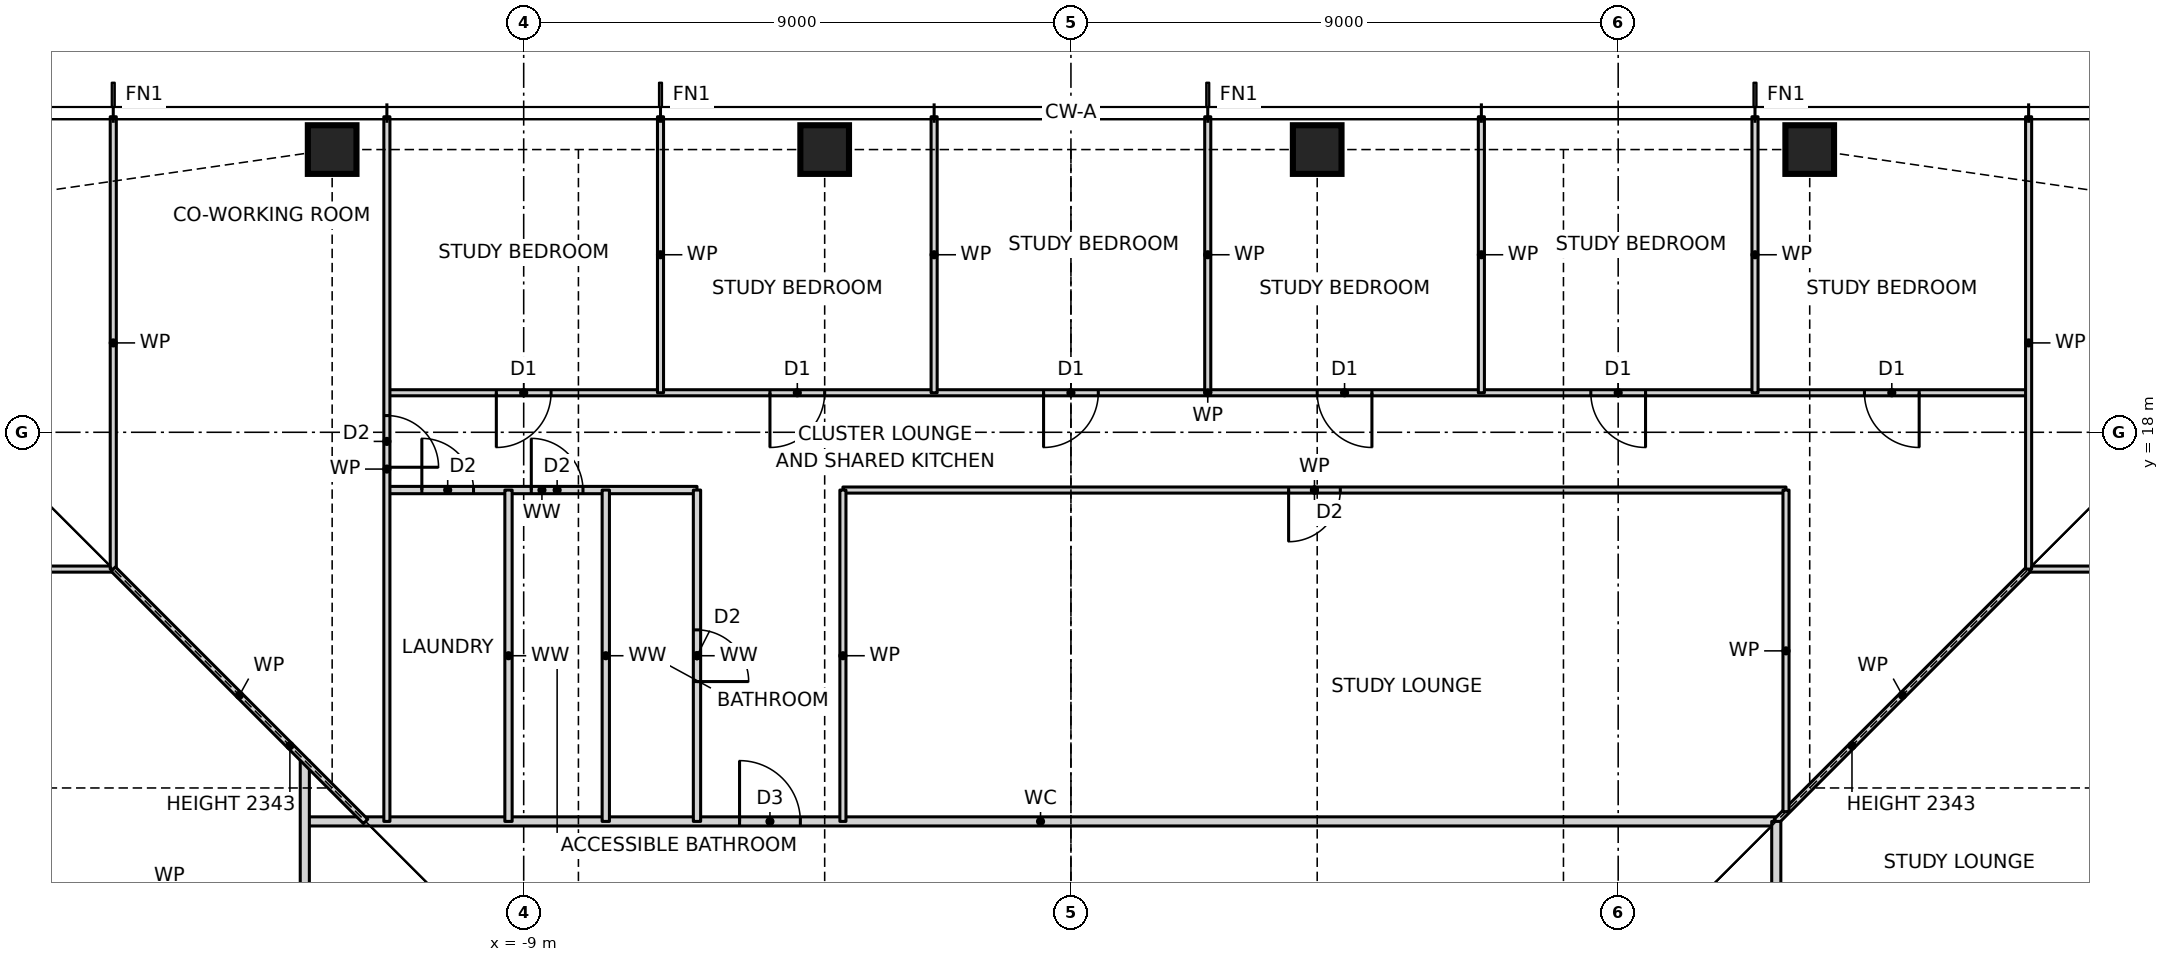
"""IFC4 building model, lengths in metres.
Left out: names, types, materials, properties, quantities, classifications, styles, units other than length and angle.
Written with IfcOpenShell. Run it as: python <this file> out.ifc"""

import sys

from ifc_helpers import new_model, si_unit, direction, frame, frame_2d, origin, origin_2d, place, context, subcontext, project, spatial, rectangle, hollow_rectangle, extrude, element, fill, save


model = new_model("IFC4")
c1 = context("Model", 3, precision=1e-05, world=origin(), true_north=direction((0.0, 1.0)))
c2 = subcontext(c1, "Body", "Model", "MODEL_VIEW")
j1 = project(units=[si_unit("LENGTHUNIT", "METRE"), si_unit("PLANEANGLEUNIT", "RADIAN")], contexts=[c1])
p1 = place(None, origin())
s1 = spatial("IfcSite", under=j1, at=p1, CompositionType="ELEMENT")
p2 = place(p1, origin())
s2 = spatial("IfcBuilding", under=s1, at=p2, CompositionType="ELEMENT")
p3 = place(p2, frame((0.0, 0.0, 50.0)))
s3 = spatial("IfcBuildingStorey", under=s2, at=p3, CompositionType="ELEMENT", Elevation=50.0)
for number, where, z_axis, x_axis in (
    (1, (12.15, 22.65, 0.0), (0.0, 0.0, 1.0), (1.0, 0.0, 0.0)),
    (2, (4.05, 22.65, 0.0), (0.0, 0.0, 1.0), (1.0, 0.0, 0.0)),
    (3, (-4.05, 22.65, 0.0), (0.0, 0.0, 1.0), (1.0, 0.0, 0.0)),
    (4, (-12.15, 22.65, 0.0), (0.0, 0.0, 1.0), (1.0, 0.0, 0.0)),
):
    element("IfcColumn", number, at=place(p3, frame(where, z_axis=z_axis, x_axis=x_axis)), inside=s3, PredefinedType="COLUMN", context=c2, shape_type="SweptSolid", body=[
        extrude(hollow_rectangle(XDim=0.8, YDim=0.8, WallThickness=0.09, at=origin_2d()), origin(), (0.0, 0.0, 1.0), 3.5),
    ])
p4 = place(p3, frame((-12.6, 11.6, 0.0), z_axis=(0.0, 0.0, 1.0), x_axis=(1.0, 0.0, 0.0)))
e5 = element("IfcWall", 5, at=p4, inside=s3, PredefinedType="PARTITIONING", context=c2, shape_type="SweptSolid", body=[
    extrude(rectangle(XDim=24.2, YDim=0.15, at=frame_2d((12.1, 0.0))), origin(), (0.0, 0.0, 1.0), 3.27),
])
p5 = place(p4, frame((7.15, 0.0, 0.0)))
e6 = element("IfcOpeningElement", 6, at=p5, cuts=e5, PredefinedType="OPENING", context=c2, shape_type="SweptSolid", body=[
    extrude(rectangle(XDim=1.0, YDim=2.1, at=frame_2d((0.5, 1.05))), frame((0.0, 0.085, 0.0), z_axis=(0.0, -1.0, 0.0), x_axis=(1.0, 0.0, 0.0)), (0.0, 0.0, 1.0), 0.17),
])
p6 = place(p3, frame((-23.19, 15.75, 0.0), z_axis=(0.0, 0.0, 1.0), x_axis=(1.0, 0.0, 0.0)))
e7 = element("IfcWall", 7, at=p6, inside=s3, PredefinedType="PARTITIONING", context=c2, shape_type="SweptSolid", body=[
    extrude(rectangle(XDim=7.44, YDim=0.1, at=frame_2d((3.72, 0.0))), origin(), (0.0, 0.0, 1.0), 3.27),
])
p7 = place(p6, frame((4.915, 0.0, 0.0)))
e8 = element("IfcOpeningElement", 8, at=p7, cuts=e7, PredefinedType="OPENING", context=c2, shape_type="SweptSolid", body=[
    extrude(rectangle(XDim=0.85, YDim=2.1, at=frame_2d((0.425, 1.05))), frame((0.0, 0.06, 0.0), z_axis=(0.0, -1.0, 0.0), x_axis=(1.0, 0.0, 0.0)), (0.0, 0.0, 1.0), 0.12),
])
p8 = place(p3, frame((15.75, 15.75, 0.0), z_axis=(0.0, 0.0, 1.0), x_axis=(1.0, 0.0, 0.0)))
e9 = element("IfcWall", 9, at=p8, inside=s3, PredefinedType="PARTITIONING", context=c2, shape_type="SweptSolid", body=[
    extrude(rectangle(XDim=7.44, YDim=0.1, at=frame_2d((3.72, 0.0))), origin(), (0.0, 0.0, 1.0), 3.27),
])
p9 = place(p8, frame((1.675, 0.0, 0.0)))
e10 = element("IfcOpeningElement", 10, at=p9, cuts=e9, PredefinedType="OPENING", context=c2, shape_type="SweptSolid", body=[
    extrude(rectangle(XDim=0.85, YDim=2.1, at=frame_2d((0.425, 1.05))), frame((0.0, 0.06, 0.0), z_axis=(0.0, -1.0, 0.0), x_axis=(1.0, 0.0, 0.0)), (0.0, 0.0, 1.0), 0.12),
])
p10 = place(p3, frame((-11.25, 17.05, 0.0), z_axis=(0.0, 0.0, 1.0), x_axis=(1.0, 0.0, 0.0)))
e11 = element("IfcWall", 11, at=p10, inside=s3, PredefinedType="PARTITIONING", context=c2, shape_type="SweptSolid", body=[
    extrude(rectangle(XDim=5.1, YDim=0.12, at=frame_2d((2.55, 0.0))), origin(), (0.0, 0.0, 1.0), 3.27),
])
p11 = place(p10, frame((2.375, 0.0, 0.0)))
e12 = element("IfcOpeningElement", 12, at=p11, cuts=e11, PredefinedType="OPENING", context=c2, shape_type="SweptSolid", body=[
    extrude(rectangle(XDim=0.85, YDim=2.1, at=frame_2d((0.425, 1.05))), frame((0.0, 0.07, 0.0), z_axis=(0.0, -1.0, 0.0), x_axis=(1.0, 0.0, 0.0)), (0.0, 0.0, 1.0), 0.14),
])
p12 = place(p10, frame((0.575, 0.0, 0.0)))
e13 = element("IfcOpeningElement", 13, at=p12, cuts=e11, PredefinedType="OPENING", context=c2, shape_type="SweptSolid", body=[
    extrude(rectangle(XDim=0.85, YDim=2.1, at=frame_2d((0.425, 1.05))), frame((0.0, 0.07, 0.0), z_axis=(0.0, -1.0, 0.0), x_axis=(1.0, 0.0, 0.0)), (0.0, 0.0, 1.0), 0.14),
])
p13 = place(p3, frame((-3.75, 17.05, 0.0), z_axis=(0.0, 0.0, 1.0), x_axis=(1.0, 0.0, 0.0)))
e14 = element("IfcWall", 14, at=p13, inside=s3, PredefinedType="PARTITIONING", context=c2, shape_type="SweptSolid", body=[
    extrude(rectangle(XDim=15.51, YDim=0.1, at=frame_2d((7.755, 0.0))), origin(), (0.0, 0.0, 1.0), 3.27),
])
p14 = place(p13, frame((7.33, 0.0, 0.0)))
e15 = element("IfcOpeningElement", 15, at=p14, cuts=e14, PredefinedType="OPENING", context=c2, shape_type="SweptSolid", body=[
    extrude(rectangle(XDim=0.85, YDim=2.1, at=frame_2d((0.425, 1.05))), frame((0.0, 0.06, 0.0), z_axis=(0.0, -1.0, 0.0), x_axis=(1.0, 0.0, 0.0)), (0.0, 0.0, 1.0), 0.12),
])
p15 = place(p3, frame((-11.25, 18.65, 0.0), z_axis=(0.0, 0.0, 1.0), x_axis=(1.0, 0.0, 0.0)))
e16 = element("IfcWall", 16, at=p15, inside=s3, PredefinedType="PARTITIONING", context=c2, shape_type="SweptSolid", body=[
    extrude(rectangle(XDim=27.0, YDim=0.1, at=frame_2d((13.5, 0.0))), origin(), (0.0, 0.0, 1.0), 3.27),
])
p16 = place(p15, frame((24.3, 0.0, 0.0)))
e17 = element("IfcOpeningElement", 17, at=p16, cuts=e16, PredefinedType="OPENING", context=c2, shape_type="SweptSolid", body=[
    extrude(rectangle(XDim=0.9, YDim=2.1, at=frame_2d((0.45, 1.05))), frame((0.0, 0.06, 0.0), z_axis=(0.0, -1.0, 0.0), x_axis=(1.0, 0.0, 0.0)), (0.0, 0.0, 1.0), 0.12),
])
p17 = place(p15, frame((19.8, 0.0, 0.0)))
e18 = element("IfcOpeningElement", 18, at=p17, cuts=e16, PredefinedType="OPENING", context=c2, shape_type="SweptSolid", body=[
    extrude(rectangle(XDim=0.9, YDim=2.1, at=frame_2d((0.45, 1.05))), frame((0.0, 0.06, 0.0), z_axis=(0.0, -1.0, 0.0), x_axis=(1.0, 0.0, 0.0)), (0.0, 0.0, 1.0), 0.12),
])
p18 = place(p15, frame((15.3, 0.0, 0.0)))
e19 = element("IfcOpeningElement", 19, at=p18, cuts=e16, PredefinedType="OPENING", context=c2, shape_type="SweptSolid", body=[
    extrude(rectangle(XDim=0.9, YDim=2.1, at=frame_2d((0.45, 1.05))), frame((0.0, 0.06, 0.0), z_axis=(0.0, -1.0, 0.0), x_axis=(1.0, 0.0, 0.0)), (0.0, 0.0, 1.0), 0.12),
])
p19 = place(p15, frame((10.8, 0.0, 0.0)))
e20 = element("IfcOpeningElement", 20, at=p19, cuts=e16, PredefinedType="OPENING", context=c2, shape_type="SweptSolid", body=[
    extrude(rectangle(XDim=0.9, YDim=2.1, at=frame_2d((0.45, 1.05))), frame((0.0, 0.06, 0.0), z_axis=(0.0, -1.0, 0.0), x_axis=(1.0, 0.0, 0.0)), (0.0, 0.0, 1.0), 0.12),
])
p20 = place(p15, frame((6.3, 0.0, 0.0)))
e21 = element("IfcOpeningElement", 21, at=p20, cuts=e16, PredefinedType="OPENING", context=c2, shape_type="SweptSolid", body=[
    extrude(rectangle(XDim=0.9, YDim=2.1, at=frame_2d((0.45, 1.05))), frame((0.0, 0.06, 0.0), z_axis=(0.0, -1.0, 0.0), x_axis=(1.0, 0.0, 0.0)), (0.0, 0.0, 1.0), 0.12),
])
p21 = place(p15, frame((1.8, 0.0, 0.0)))
e22 = element("IfcOpeningElement", 22, at=p21, cuts=e16, PredefinedType="OPENING", context=c2, shape_type="SweptSolid", body=[
    extrude(rectangle(XDim=0.9, YDim=2.1, at=frame_2d((0.45, 1.05))), frame((0.0, 0.06, 0.0), z_axis=(0.0, -1.0, 0.0), x_axis=(1.0, 0.0, 0.0)), (0.0, 0.0, 1.0), 0.12),
])
p22 = place(p3, frame((11.6, 11.6, 0.0), z_axis=(0.0, 0.0, 1.0), x_axis=(0.707106781187, 0.707106781187, 0.0)))
e23 = element("IfcWall", 23, at=p22, inside=s3, PredefinedType="PARTITIONING", context=c2, shape_type="SweptSolid", body=[
    extrude(rectangle(XDim=5.869, YDim=0.1, at=frame_2d((2.935, 0.0))), origin(), (0.0, 0.0, 1.0), 2.343),
])
p23 = place(p3, frame((15.75, 15.75, 0.0), z_axis=(0.0, 0.0, 1.0), x_axis=(0.0, 1.0, 0.0)))
e24 = element("IfcWall", 24, at=p23, inside=s3, PredefinedType="PARTITIONING", context=c2, shape_type="SweptSolid", body=[
    extrude(rectangle(XDim=7.44, YDim=0.1, at=frame_2d((3.72, 0.0))), origin(), (0.0, 0.0, 1.0), 3.27),
])
p24 = place(p3, frame((11.76, 11.76, 0.0), z_axis=(0.0, 0.0, 1.0), x_axis=(0.0, 1.0, 0.0)))
e25 = element("IfcWall", 25, at=p24, inside=s3, PredefinedType="PARTITIONING", context=c2, shape_type="SweptSolid", body=[
    extrude(rectangle(XDim=5.29, YDim=0.1, at=frame_2d((2.645, 0.0))), origin(), (0.0, 0.0, 1.0), 3.27),
])
p25 = place(p3, frame((11.6, -11.6, 0.0), z_axis=(0.0, 0.0, 1.0), x_axis=(0.0, 1.0, 0.0)))
e26 = element("IfcWall", 26, at=p25, inside=s3, PredefinedType="PARTITIONING", context=c2, shape_type="SweptSolid", body=[
    extrude(rectangle(XDim=23.2, YDim=0.15, at=frame_2d((11.6, 0.0))), origin(), (0.0, 0.0, 1.0), 3.27),
])
p26 = place(p25, frame((1.65, 0.0, 0.0)))
e27 = element("IfcOpeningElement", 27, at=p26, cuts=e26, PredefinedType="OPENING", context=c2, shape_type="SweptSolid", body=[
    extrude(rectangle(XDim=1.0, YDim=2.1, at=frame_2d((0.5, 1.05))), frame((0.0, 0.085, 0.0), z_axis=(0.0, -1.0, 0.0), x_axis=(1.0, 0.0, 0.0)), (0.0, 0.0, 1.0), 0.17),
])
p27 = place(p25, frame((3.8, 0.0, 0.0)))
e28 = element("IfcOpeningElement", 28, at=p27, cuts=e26, PredefinedType="OPENING", context=c2, shape_type="SweptSolid", body=[
    extrude(rectangle(XDim=0.9, YDim=2.1, at=frame_2d((0.45, 1.05))), frame((0.0, 0.085, 0.0), z_axis=(0.0, -1.0, 0.0), x_axis=(1.0, 0.0, 0.0)), (0.0, 0.0, 1.0), 0.17),
])
for number, where, z_axis, x_axis in (
    (29, (11.25, 18.65, 0.0), (0.0, 0.0, 1.0), (0.0, 1.0, 0.0)),
    (30, (6.75, 18.65, 0.0), (0.0, 0.0, 1.0), (0.0, 1.0, 0.0)),
    (31, (2.25, 18.65, 0.0), (0.0, 0.0, 1.0), (0.0, 1.0, 0.0)),
    (32, (-2.25, 18.65, 0.0), (0.0, 0.0, 1.0), (0.0, 1.0, 0.0)),
):
    element("IfcWall", number, at=place(p3, frame(where, z_axis=z_axis, x_axis=x_axis)), inside=s3, PredefinedType="PARTITIONING", context=c2, shape_type="SweptSolid", body=[
        extrude(rectangle(XDim=4.54, YDim=0.1, at=frame_2d((2.27, 0.0))), origin(), (0.0, 0.0, 1.0), 3.27),
    ])
p28 = place(p3, frame((-3.75, 11.6, 0.0), z_axis=(0.0, 0.0, 1.0), x_axis=(0.0, 1.0, 0.0)))
e33 = element("IfcWall", 33, at=p28, inside=s3, PredefinedType="PARTITIONING", context=c2, shape_type="SweptSolid", body=[
    extrude(rectangle(XDim=5.45, YDim=0.1, at=frame_2d((2.725, 0.0))), origin(), (0.0, 0.0, 1.0), 3.27),
])
p29 = place(p3, frame((-6.15, 11.6, 0.0), z_axis=(0.0, 0.0, 1.0), x_axis=(0.0, 1.0, 0.0)))
e34 = element("IfcWall", 34, at=p29, inside=s3, PredefinedType="PARTITIONING", context=c2, shape_type="SweptSolid", body=[
    extrude(rectangle(XDim=5.45, YDim=0.12, at=frame_2d((2.725, 0.0))), origin(), (0.0, 0.0, 1.0), 3.27),
])
p30 = place(p29, frame((2.3, 0.0, 0.0)))
e35 = element("IfcOpeningElement", 35, at=p30, cuts=e34, PredefinedType="OPENING", context=c2, shape_type="SweptSolid", body=[
    extrude(rectangle(XDim=0.85, YDim=2.1, at=frame_2d((0.425, 1.05))), frame((0.0, 0.07, 0.0), z_axis=(0.0, -1.0, 0.0), x_axis=(1.0, 0.0, 0.0)), (0.0, 0.0, 1.0), 0.14),
])
p31 = place(p3, frame((-6.75, 18.65, 0.0), z_axis=(0.0, 0.0, 1.0), x_axis=(0.0, 1.0, 0.0)))
e36 = element("IfcWall", 36, at=p31, inside=s3, PredefinedType="PARTITIONING", context=c2, shape_type="SweptSolid", body=[
    extrude(rectangle(XDim=4.54, YDim=0.1, at=frame_2d((2.27, 0.0))), origin(), (0.0, 0.0, 1.0), 3.27),
])
for number, where, z_axis, x_axis in (
    (37, (-7.65, 11.6, 0.0), (0.0, 0.0, 1.0), (0.0, 1.0, 0.0)),
    (38, (-9.25, 11.6, 0.0), (0.0, 0.0, 1.0), (0.0, 1.0, 0.0)),
):
    element("IfcWall", number, at=place(p3, frame(where, z_axis=z_axis, x_axis=x_axis)), inside=s3, PredefinedType="PARTITIONING", context=c2, shape_type="SweptSolid", body=[
        extrude(rectangle(XDim=5.45, YDim=0.12, at=frame_2d((2.725, 0.0))), origin(), (0.0, 0.0, 1.0), 3.27),
    ])
p32 = place(p3, frame((-11.25, 11.6, 0.0), z_axis=(0.0, 0.0, 1.0), x_axis=(0.0, 1.0, 0.0)))
e39 = element("IfcWall", 39, at=p32, inside=s3, PredefinedType="PARTITIONING", context=c2, shape_type="SweptSolid", body=[
    extrude(rectangle(XDim=11.59, YDim=0.1, at=frame_2d((5.795, 0.0))), origin(), (0.0, 0.0, 1.0), 3.27),
])
p33 = place(p32, frame((5.825, 0.0, 0.0)))
e40 = element("IfcOpeningElement", 40, at=p33, cuts=e39, PredefinedType="OPENING", context=c2, shape_type="SweptSolid", body=[
    extrude(rectangle(XDim=0.85, YDim=2.1, at=frame_2d((0.425, 1.05))), frame((0.0, 0.06, 0.0), z_axis=(0.0, -1.0, 0.0), x_axis=(1.0, 0.0, 0.0)), (0.0, 0.0, 1.0), 0.12),
])
p34 = place(p3, frame((-12.6, -12.6, 0.0), z_axis=(0.0, 0.0, 1.0), x_axis=(0.0, 1.0, 0.0)))
e41 = element("IfcWall", 41, at=p34, inside=s3, PredefinedType="PARTITIONING", context=c2, shape_type="SweptSolid", body=[
    extrude(rectangle(XDim=25.2, YDim=0.15, at=frame_2d((12.6, 0.0))), origin(), (0.0, 0.0, 1.0), 3.27),
])
p35 = place(p34, frame((7.15, 0.0, 0.0)))
e42 = element("IfcOpeningElement", 42, at=p35, cuts=e41, PredefinedType="OPENING", context=c2, shape_type="SweptSolid", body=[
    extrude(rectangle(XDim=1.0, YDim=2.1, at=frame_2d((0.5, 1.05))), frame((0.0, 0.085, 0.0), z_axis=(0.0, -1.0, 0.0), x_axis=(1.0, 0.0, 0.0)), (0.0, 0.0, 1.0), 0.17),
])
p36 = place(p3, frame((-15.75, 15.75, 0.0), z_axis=(0.0, 0.0, 1.0), x_axis=(0.0, 1.0, 0.0)))
e43 = element("IfcWall", 43, at=p36, inside=s3, PredefinedType="PARTITIONING", context=c2, shape_type="SweptSolid", body=[
    extrude(rectangle(XDim=7.44, YDim=0.1, at=frame_2d((3.72, 0.0))), origin(), (0.0, 0.0, 1.0), 3.27),
])
p37 = place(p3, frame((-11.6, 11.6, 0.0), z_axis=(0.0, 0.0, 1.0), x_axis=(-0.707106781187, 0.707106781187, 0.0)))
e44 = element("IfcWall", 44, at=p37, inside=s3, PredefinedType="PARTITIONING", context=c2, shape_type="SweptSolid", body=[
    extrude(rectangle(XDim=5.869, YDim=0.1, at=frame_2d((2.935, 0.0))), origin(), (0.0, 0.0, 1.0), 2.343),
])
p38 = place(p16, frame((0.9, 0.0, 0.0), z_axis=(0.0, 0.0, 1.0), x_axis=(-1.0, 0.0, 0.0)))
e45 = element("IfcDoor", 45, at=p38, inside=s3, OperationType="SINGLE_SWING_LEFT", PredefinedType="DOOR", context=c2, shape_type="SweptSolid", body=[
    extrude(rectangle(XDim=0.9, YDim=2.1, at=frame_2d((0.45, 1.05))), frame((0.0, 0.025, 0.0), z_axis=(0.0, -1.0, 0.0), x_axis=(1.0, 0.0, 0.0)), (0.0, 0.0, 1.0), 0.05),
])
fill(e17, e45)
p39 = place(p17, frame((0.9, 0.0, 0.0), z_axis=(0.0, 0.0, 1.0), x_axis=(-1.0, 0.0, 0.0)))
e46 = element("IfcDoor", 46, at=p39, inside=s3, OperationType="SINGLE_SWING_LEFT", PredefinedType="DOOR", context=c2, shape_type="SweptSolid", body=[
    extrude(rectangle(XDim=0.9, YDim=2.1, at=frame_2d((0.45, 1.05))), frame((0.0, 0.025, 0.0), z_axis=(0.0, -1.0, 0.0), x_axis=(1.0, 0.0, 0.0)), (0.0, 0.0, 1.0), 0.05),
])
fill(e18, e46)
p40 = place(p18, frame((0.9, 0.0, 0.0), z_axis=(0.0, 0.0, 1.0), x_axis=(-1.0, 0.0, 0.0)))
e47 = element("IfcDoor", 47, at=p40, inside=s3, OperationType="SINGLE_SWING_LEFT", PredefinedType="DOOR", context=c2, shape_type="SweptSolid", body=[
    extrude(rectangle(XDim=0.9, YDim=2.1, at=frame_2d((0.45, 1.05))), frame((0.0, 0.025, 0.0), z_axis=(0.0, -1.0, 0.0), x_axis=(1.0, 0.0, 0.0)), (0.0, 0.0, 1.0), 0.05),
])
fill(e19, e47)
p41 = place(p19, frame((0.9, 0.0, 0.0), z_axis=(0.0, 0.0, 1.0), x_axis=(-1.0, 0.0, 0.0)))
e48 = element("IfcDoor", 48, at=p41, inside=s3, OperationType="SINGLE_SWING_RIGHT", PredefinedType="DOOR", context=c2, shape_type="SweptSolid", body=[
    extrude(rectangle(XDim=0.9, YDim=2.1, at=frame_2d((0.45, 1.05))), frame((0.0, 0.025, 0.0), z_axis=(0.0, -1.0, 0.0), x_axis=(1.0, 0.0, 0.0)), (0.0, 0.0, 1.0), 0.05),
])
fill(e20, e48)
p42 = place(p20, frame((0.9, 0.0, 0.0), z_axis=(0.0, 0.0, 1.0), x_axis=(-1.0, 0.0, 0.0)))
e49 = element("IfcDoor", 49, at=p42, inside=s3, OperationType="SINGLE_SWING_RIGHT", PredefinedType="DOOR", context=c2, shape_type="SweptSolid", body=[
    extrude(rectangle(XDim=0.9, YDim=2.1, at=frame_2d((0.45, 1.05))), frame((0.0, 0.025, 0.0), z_axis=(0.0, -1.0, 0.0), x_axis=(1.0, 0.0, 0.0)), (0.0, 0.0, 1.0), 0.05),
])
fill(e21, e49)
p43 = place(p21, frame((0.9, 0.0, 0.0), z_axis=(0.0, 0.0, 1.0), x_axis=(-1.0, 0.0, 0.0)))
e50 = element("IfcDoor", 50, at=p43, inside=s3, OperationType="SINGLE_SWING_RIGHT", PredefinedType="DOOR", context=c2, shape_type="SweptSolid", body=[
    extrude(rectangle(XDim=0.9, YDim=2.1, at=frame_2d((0.45, 1.05))), frame((0.0, 0.025, 0.0), z_axis=(0.0, -1.0, 0.0), x_axis=(1.0, 0.0, 0.0)), (0.0, 0.0, 1.0), 0.05),
])
fill(e22, e50)
p44 = place(p5, origin())
e51 = element("IfcDoor", 51, at=p44, inside=s3, OperationType="SINGLE_SWING_LEFT", PredefinedType="DOOR", context=c2, shape_type="SweptSolid", body=[
    extrude(rectangle(XDim=1.0, YDim=2.1, at=frame_2d((0.5, 1.05))), frame((0.0, 0.025, 0.0), z_axis=(0.0, -1.0, 0.0), x_axis=(1.0, 0.0, 0.0)), (0.0, 0.0, 1.0), 0.05),
])
fill(e6, e51)
p45 = place(p14, frame((0.85, 0.0, 0.0), z_axis=(0.0, 0.0, 1.0), x_axis=(-1.0, 0.0, 0.0)))
e52 = element("IfcDoor", 52, at=p45, inside=s3, OperationType="SINGLE_SWING_RIGHT", PredefinedType="DOOR", context=c2, shape_type="SweptSolid", body=[
    extrude(rectangle(XDim=0.85, YDim=2.1, at=frame_2d((0.425, 1.05))), frame((0.0, 0.025, 0.0), z_axis=(0.0, -1.0, 0.0), x_axis=(1.0, 0.0, 0.0)), (0.0, 0.0, 1.0), 0.05),
])
fill(e15, e52)
p46 = place(p30, frame((0.85, 0.0, 0.0), z_axis=(0.0, 0.0, 1.0), x_axis=(-1.0, 0.0, 0.0)))
e53 = element("IfcDoor", 53, at=p46, inside=s3, OperationType="SINGLE_SWING_RIGHT", PredefinedType="DOOR", context=c2, shape_type="SweptSolid", body=[
    extrude(rectangle(XDim=0.85, YDim=2.1, at=frame_2d((0.425, 1.05))), frame((0.0, 0.025, 0.0), z_axis=(0.0, -1.0, 0.0), x_axis=(1.0, 0.0, 0.0)), (0.0, 0.0, 1.0), 0.05),
])
fill(e35, e53)
p47 = place(p11, origin())
e54 = element("IfcDoor", 54, at=p47, inside=s3, OperationType="SINGLE_SWING_LEFT", PredefinedType="DOOR", context=c2, shape_type="SweptSolid", body=[
    extrude(rectangle(XDim=0.85, YDim=2.1, at=frame_2d((0.425, 1.05))), frame((0.0, 0.025, 0.0), z_axis=(0.0, -1.0, 0.0), x_axis=(1.0, 0.0, 0.0)), (0.0, 0.0, 1.0), 0.05),
])
fill(e12, e54)
p48 = place(p12, origin())
e55 = element("IfcDoor", 55, at=p48, inside=s3, OperationType="SINGLE_SWING_LEFT", PredefinedType="DOOR", context=c2, shape_type="SweptSolid", body=[
    extrude(rectangle(XDim=0.85, YDim=2.1, at=frame_2d((0.425, 1.05))), frame((0.0, 0.025, 0.0), z_axis=(0.0, -1.0, 0.0), x_axis=(1.0, 0.0, 0.0)), (0.0, 0.0, 1.0), 0.05),
])
fill(e13, e55)
p49 = place(p33, frame((0.85, 0.0, 0.0), z_axis=(0.0, 0.0, 1.0), x_axis=(-1.0, 0.0, 0.0)))
e56 = element("IfcDoor", 56, at=p49, inside=s3, OperationType="SINGLE_SWING_RIGHT", PredefinedType="DOOR", context=c2, shape_type="SweptSolid", body=[
    extrude(rectangle(XDim=0.85, YDim=2.1, at=frame_2d((0.425, 1.05))), frame((0.0, 0.025, 0.0), z_axis=(0.0, -1.0, 0.0), x_axis=(1.0, 0.0, 0.0)), (0.0, 0.0, 1.0), 0.05),
])
fill(e40, e56)
save(model, sys.argv[1])
